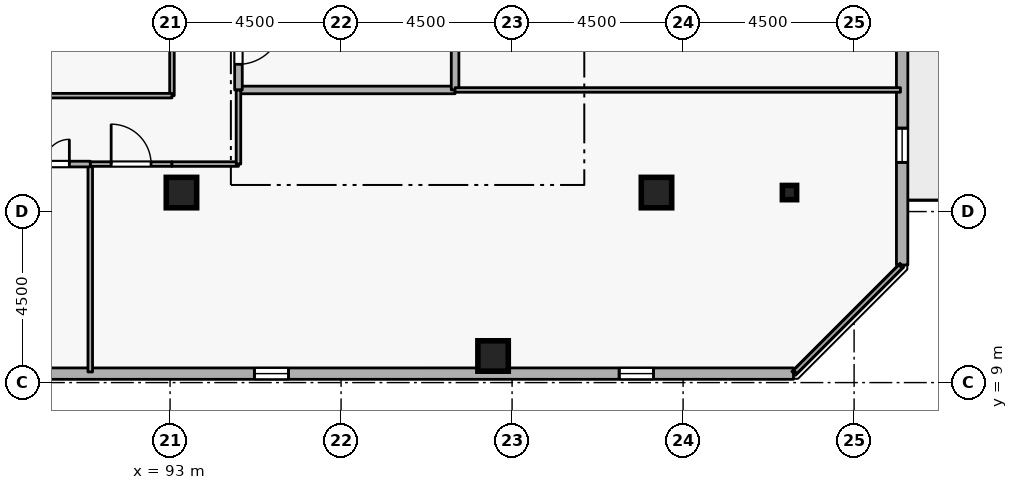
"""IFC4 building model, lengths in metres.
Left out: names, types, materials, properties, quantities, classifications, styles, units other than length and angle.
Written with IfcOpenShell. Run it as: python <this file> out.ifc"""

import sys

from ifc_helpers import new_model, si_unit, direction, frame, frame_2d, origin, origin_2d, place, context, subcontext, project, spatial, rectangle, i_section, extrude, element, fill, save


model = new_model("IFC4")
c1 = context("Model", 3, precision=1e-05, world=origin(), true_north=direction((0.0, 1.0)))
c2 = subcontext(c1, "Body", "Model", "MODEL_VIEW")
j1 = project(units=[si_unit("LENGTHUNIT", "METRE"), si_unit("PLANEANGLEUNIT", "RADIAN")], contexts=[c1])
p1 = place(None, origin())
s1 = spatial("IfcSite", under=j1, at=p1, CompositionType="ELEMENT")
p2 = place(p1, origin())
s2 = spatial("IfcBuilding", under=s1, at=p2, CompositionType="ELEMENT")
p3 = place(p2, frame((0.0, 0.0, 272.7)))
s3 = spatial("IfcBuildingStorey", under=s2, at=p3, CompositionType="ELEMENT", Elevation=272.7)
for number, where, z_axis, x_axis in (
    (1, (105.8, 14.0, 0.0), (0.0, 0.0, 1.0), (1.0, 0.0, 0.0)),
    (2, (101.5, 9.7, 0.0), (0.0, 0.0, 1.0), (1.0, 0.0, 0.0)),
    (3, (93.3, 14.0, 0.0), (0.0, 0.0, 1.0), (1.0, 0.0, 0.0)),
):
    element("IfcColumn", number, at=place(p3, frame(where, z_axis=z_axis, x_axis=x_axis)), inside=s3, PredefinedType="COLUMN", context=c2, shape_type="SweptSolid", body=[
        extrude(rectangle(XDim=0.8, YDim=0.8, at=origin_2d()), origin(), (0.0, 0.0, 1.0), 3.6),
    ])
p4 = place(p3, frame((109.3, 14.0, 0.0), z_axis=(0.0, 0.0, 1.0), x_axis=(1.0, 0.0, 0.0)))
e4 = element("IfcColumn", 4, at=p4, inside=s3, PredefinedType="COLUMN", context=c2, shape_type="SweptSolid", body=[
    extrude(i_section(OverallWidth=0.375, OverallDepth=0.375, WebThickness=0.017, FlangeThickness=0.027, FilletRadius=0.015, at=origin_2d()), origin(), (0.0, 0.0, 1.0), 3.6),
])
p5 = place(p3, frame((73.319, 9.235, 0.0), z_axis=(0.0, 0.0, 1.0), x_axis=(0.999999999634, 2.7061402e-05, 0.0)))
e5 = element("IfcWall", 5, at=p5, inside=s3, PredefinedType="STANDARD", context=c2, shape_type="SweptSolid", body=[
    extrude(rectangle(XDim=36.087, YDim=0.3, at=frame_2d((18.043, 0.0))), origin(), (0.0, 0.0, 1.0), 2.7),
])
p6 = place(p5, frame((7.5, 0.0, 0.72)))
e6 = element("IfcOpeningElement", 6, at=p6, cuts=e5, PredefinedType="OPENING", context=c2, shape_type="SweptSolid", body=[
    extrude(rectangle(XDim=0.9, YDim=1.75, at=frame_2d((0.45, 0.875))), frame((0.0, 0.16, 0.0), z_axis=(0.0, -1.0, 0.0), x_axis=(1.0, 0.0, 0.0)), (0.0, 0.0, 1.0), 0.32),
])
p7 = place(p5, frame((21.9, 0.0, 0.72)))
e7 = element("IfcOpeningElement", 7, at=p7, cuts=e5, PredefinedType="OPENING", context=c2, shape_type="SweptSolid", body=[
    extrude(rectangle(XDim=0.9, YDim=1.75, at=frame_2d((0.45, 0.875))), frame((0.0, 0.16, 0.0), z_axis=(0.0, -1.0, 0.0), x_axis=(1.0, 0.0, 0.0)), (0.0, 0.0, 1.0), 0.32),
])
p8 = place(p5, frame((31.5, 0.0, 0.72)))
e8 = element("IfcOpeningElement", 8, at=p8, cuts=e5, PredefinedType="OPENING", context=c2, shape_type="SweptSolid", body=[
    extrude(rectangle(XDim=0.9, YDim=1.75, at=frame_2d((0.45, 0.875))), frame((0.0, 0.16, 0.0), z_axis=(0.0, -1.0, 0.0), x_axis=(1.0, 0.0, 0.0)), (0.0, 0.0, 1.0), 0.32),
])
p9 = place(p3, frame((112.264, 12.094, 0.0), z_axis=(0.0, 0.0, 1.0), x_axis=(2.7061402e-05, 0.999999999634, 0.0)))
e9 = element("IfcWall", 9, at=p9, inside=s3, PredefinedType="STANDARD", context=c2, shape_type="SweptSolid", body=[
    extrude(rectangle(XDim=36.087, YDim=0.3, at=frame_2d((18.043, 0.0))), origin(), (0.0, 0.0, 1.0), 2.7),
])
p10 = place(p9, frame((22.993, 0.0, 0.0)))
e10 = element("IfcOpeningElement", 10, at=p10, cuts=e9, PredefinedType="OPENING", context=c2, shape_type="SweptSolid", body=[
    extrude(rectangle(XDim=1.0, YDim=2.08, at=frame_2d((0.5, 1.04))), frame((0.0, 0.16, 0.0), z_axis=(0.0, -1.0, 0.0), x_axis=(1.0, 0.0, 0.0)), (0.0, 0.0, 1.0), 0.32),
])
p11 = place(p9, frame((2.7, 0.0, 0.72)))
e11 = element("IfcOpeningElement", 11, at=p11, cuts=e9, PredefinedType="OPENING", context=c2, shape_type="SweptSolid", body=[
    extrude(rectangle(XDim=0.9, YDim=1.75, at=frame_2d((0.45, 0.875))), frame((0.0, 0.16, 0.0), z_axis=(0.0, -1.0, 0.0), x_axis=(1.0, 0.0, 0.0)), (0.0, 0.0, 1.0), 0.32),
])
p12 = place(p9, frame((7.5, 0.0, 0.72)))
e12 = element("IfcOpeningElement", 12, at=p12, cuts=e9, PredefinedType="OPENING", context=c2, shape_type="SweptSolid", body=[
    extrude(rectangle(XDim=0.9, YDim=1.75, at=frame_2d((0.45, 0.875))), frame((0.0, 0.16, 0.0), z_axis=(0.0, -1.0, 0.0), x_axis=(1.0, 0.0, 0.0)), (0.0, 0.0, 1.0), 0.32),
])
p13 = place(p9, frame((12.3, 0.0, 0.72)))
e13 = element("IfcOpeningElement", 13, at=p13, cuts=e9, PredefinedType="OPENING", context=c2, shape_type="SweptSolid", body=[
    extrude(rectangle(XDim=0.9, YDim=1.75, at=frame_2d((0.45, 0.875))), frame((0.0, 0.16, 0.0), z_axis=(0.0, -1.0, 0.0), x_axis=(1.0, 0.0, 0.0)), (0.0, 0.0, 1.0), 0.32),
])
p14 = place(p9, frame((17.1, 0.0, 0.72)))
e14 = element("IfcOpeningElement", 14, at=p14, cuts=e9, PredefinedType="OPENING", context=c2, shape_type="SweptSolid", body=[
    extrude(rectangle(XDim=0.9, YDim=1.75, at=frame_2d((0.45, 0.875))), frame((0.0, 0.16, 0.0), z_axis=(0.0, -1.0, 0.0), x_axis=(1.0, 0.0, 0.0)), (0.0, 0.0, 1.0), 0.32),
])
p15 = place(p9, frame((26.7, 0.0, 0.72)))
e15 = element("IfcOpeningElement", 15, at=p15, cuts=e9, PredefinedType="OPENING", context=c2, shape_type="SweptSolid", body=[
    extrude(rectangle(XDim=0.9, YDim=1.75, at=frame_2d((0.45, 0.875))), frame((0.0, 0.16, 0.0), z_axis=(0.0, -1.0, 0.0), x_axis=(1.0, 0.0, 0.0)), (0.0, 0.0, 1.0), 0.32),
])
p16 = place(p9, frame((31.5, 0.0, 0.72)))
e16 = element("IfcOpeningElement", 16, at=p16, cuts=e9, PredefinedType="OPENING", context=c2, shape_type="SweptSolid", body=[
    extrude(rectangle(XDim=0.9, YDim=1.75, at=frame_2d((0.45, 0.875))), frame((0.0, 0.16, 0.0), z_axis=(0.0, -1.0, 0.0), x_axis=(1.0, 0.0, 0.0)), (0.0, 0.0, 1.0), 0.32),
])
p17 = place(p3, frame((94.8, 16.7, 0.0), z_axis=(0.0, 0.0, 1.0), x_axis=(1.0, 0.0, 0.0)))
e17 = element("IfcWall", 17, at=p17, inside=s3, PredefinedType="STANDARD", context=c2, shape_type="SweptSolid", body=[
    extrude(rectangle(XDim=5.7, YDim=0.2, at=frame_2d((2.85, 0.0))), origin(), (0.0, 0.0, 1.0), 3.34),
])
p18 = place(p3, frame((100.5, 16.7, 0.0), z_axis=(0.0, 0.0, 1.0), x_axis=(0.0, 1.0, 0.0)))
e18 = element("IfcWall", 18, at=p18, inside=s3, PredefinedType="STANDARD", context=c2, shape_type="SweptSolid", body=[
    extrude(rectangle(XDim=2.5, YDim=0.2, at=frame_2d((1.25, 0.0))), origin(), (0.0, 0.0, 1.0), 3.34),
])
p19 = place(p3, frame((94.8, 19.2, 0.0), z_axis=(0.0, 0.0, 1.0), x_axis=(0.0, -1.0, 0.0)))
e19 = element("IfcWall", 19, at=p19, inside=s3, PredefinedType="STANDARD", context=c2, shape_type="SweptSolid", body=[
    extrude(rectangle(XDim=2.5, YDim=0.2, at=frame_2d((1.25, 0.0))), origin(), (0.0, 0.0, 1.0), 3.34),
])
p20 = place(p19, frame((0.675, 0.0, 0.0)))
e20 = element("IfcOpeningElement", 20, at=p20, cuts=e19, PredefinedType="OPENING", context=c2, shape_type="SweptSolid", body=[
    extrude(rectangle(XDim=1.15, YDim=2.1, at=frame_2d((0.575, 1.05))), frame((0.0, 0.11, 0.0), z_axis=(0.0, -1.0, 0.0), x_axis=(1.0, 0.0, 0.0)), (0.0, 0.0, 1.0), 0.22),
])
p21 = place(p3, frame((90.9, 9.28, 0.0), z_axis=(0.0, 0.0, 1.0), x_axis=(0.0, 1.0, 0.0)))
e21 = element("IfcWall", 21, at=p21, inside=s3, PredefinedType="PARTITIONING", context=c2, shape_type="SweptSolid", body=[
    extrude(rectangle(XDim=5.47, YDim=0.12, at=frame_2d((2.735, 0.0))), origin(), (0.0, 0.0, 1.0), 3.34),
])
p22 = place(p3, frame((90.9, 14.75, 0.0), z_axis=(0.0, 0.0, 1.0), x_axis=(1.0, 0.0, 0.0)))
e22 = element("IfcWall", 22, at=p22, inside=s3, PredefinedType="PARTITIONING", context=c2, shape_type="SweptSolid", body=[
    extrude(rectangle(XDim=2.15, YDim=0.12, at=frame_2d((1.075, 0.0))), origin(), (0.0, 0.0, 1.0), 3.34),
])
p23 = place(p22, frame((0.55, 0.0, 0.0)))
e23 = element("IfcOpeningElement", 23, at=p23, cuts=e22, PredefinedType="OPENING", context=c2, shape_type="SweptSolid", body=[
    extrude(rectangle(XDim=1.05, YDim=2.1, at=frame_2d((0.525, 1.05))), frame((0.0, 0.07, 0.0), z_axis=(0.0, -1.0, 0.0), x_axis=(1.0, 0.0, 0.0)), (0.0, 0.0, 1.0), 0.14),
])
p24 = place(p3, frame((93.05, 14.75, 0.0), z_axis=(0.0, 0.0, 1.0), x_axis=(1.0, 0.0, 0.0)))
e24 = element("IfcWall", 24, at=p24, inside=s3, PredefinedType="PARTITIONING", context=c2, shape_type="SweptSolid", body=[
    extrude(rectangle(XDim=1.75, YDim=0.12, at=frame_2d((0.875, 0.0))), origin(), (0.0, 0.0, 1.0), 3.34),
])
p25 = place(p3, frame((94.8, 14.75, 0.0), z_axis=(0.0, 0.0, 1.0), x_axis=(0.0, 1.0, 0.0)))
e25 = element("IfcWall", 25, at=p25, inside=s3, PredefinedType="PARTITIONING", context=c2, shape_type="SweptSolid", body=[
    extrude(rectangle(XDim=1.95, YDim=0.12, at=frame_2d((0.975, 0.0))), origin(), (0.0, 0.0, 1.0), 3.34),
])
p26 = place(p3, frame((100.5, 16.7, 0.0), z_axis=(0.0, 0.0, 1.0), x_axis=(1.0, 0.0, 0.0)))
e26 = element("IfcWall", 26, at=p26, inside=s3, PredefinedType="PARTITIONING", context=c2, shape_type="SweptSolid", body=[
    extrude(rectangle(XDim=11.72, YDim=0.12, at=frame_2d((5.86, 0.0))), origin(), (0.0, 0.0, 1.0), 3.34),
])
p27 = place(p3, frame((112.22, 12.052, 0.0), z_axis=(0.0, 0.0, 1.0), x_axis=(-0.707106781187, -0.707106781187, 0.0)))
e27 = element("IfcWall", 27, at=p27, inside=s3, PredefinedType="PARTITIONING", context=c2, shape_type="SweptSolid", body=[
    extrude(rectangle(XDim=3.919, YDim=0.12, at=frame_2d((1.96, 0.0))), origin(), (0.0, 0.0, 1.0), 3.34),
])
p28 = place(p3, frame((88.5, 14.75, 0.0), z_axis=(0.0, 0.0, 1.0), x_axis=(1.0, 0.0, 0.0)))
e28 = element("IfcWall", 28, at=p28, inside=s3, PredefinedType="PARTITIONING", context=c2, shape_type="SweptSolid", body=[
    extrude(rectangle(XDim=2.4, YDim=0.15, at=frame_2d((1.2, 0.0))), origin(), (0.0, 0.0, 1.0), 3.34),
])
p29 = place(p28, frame((0.55, 0.0, 0.0)))
e29 = element("IfcOpeningElement", 29, at=p29, cuts=e28, PredefinedType="OPENING", context=c2, shape_type="SweptSolid", body=[
    extrude(rectangle(XDim=1.3, YDim=2.12, at=frame_2d((0.65, 1.06))), frame((0.0, 0.085, 0.0), z_axis=(0.0, -1.0, 0.0), x_axis=(1.0, 0.0, 0.0)), (0.0, 0.0, 1.0), 0.17),
])
p30 = place(p3, frame((93.05, 22.4, 0.0), z_axis=(0.0, 0.0, 1.0), x_axis=(0.0, -1.0, 0.0)))
e30 = element("IfcWall", 30, at=p30, inside=s3, PredefinedType="PARTITIONING", context=c2, shape_type="SweptSolid", body=[
    extrude(rectangle(XDim=5.85, YDim=0.12, at=frame_2d((2.925, 0.0))), origin(), (0.0, 0.0, 1.0), 3.34),
])
p31 = place(p30, frame((2.45, 0.0, 0.0)))
e31 = element("IfcOpeningElement", 31, at=p31, cuts=e30, PredefinedType="OPENING", context=c2, shape_type="SweptSolid", body=[
    extrude(rectangle(XDim=0.95, YDim=2.1, at=frame_2d((0.475, 1.05))), frame((0.0, 0.07, 0.0), z_axis=(0.0, -1.0, 0.0), x_axis=(1.0, 0.0, 0.0)), (0.0, 0.0, 1.0), 0.14),
])
p32 = place(p3, frame((93.05, 16.55, 0.0), z_axis=(0.0, 0.0, 1.0), x_axis=(-1.0, 0.0, 0.0)))
e32 = element("IfcWall", 32, at=p32, inside=s3, PredefinedType="PARTITIONING", context=c2, shape_type="SweptSolid", body=[
    extrude(rectangle(XDim=3.75, YDim=0.12, at=frame_2d((1.875, 0.0))), origin(), (0.0, 0.0, 1.0), 3.34),
])
p33 = place(p7, origin())
e33 = element("IfcWindow", 33, at=p33, inside=s3, PartitioningType="SINGLE_PANEL", PredefinedType="WINDOW", context=c2, shape_type="SweptSolid", body=[
    extrude(rectangle(XDim=0.9, YDim=1.75, at=frame_2d((0.45, 0.875))), frame((0.0, 0.03, 0.0), z_axis=(0.0, -1.0, 0.0), x_axis=(1.0, 0.0, 0.0)), (0.0, 0.0, 1.0), 0.06),
])
fill(e7, e33)
p34 = place(p8, origin())
e34 = element("IfcWindow", 34, at=p34, inside=s3, PartitioningType="SINGLE_PANEL", PredefinedType="WINDOW", context=c2, shape_type="SweptSolid", body=[
    extrude(rectangle(XDim=0.9, YDim=1.75, at=frame_2d((0.45, 0.875))), frame((0.0, 0.03, 0.0), z_axis=(0.0, -1.0, 0.0), x_axis=(1.0, 0.0, 0.0)), (0.0, 0.0, 1.0), 0.06),
])
fill(e8, e34)
p35 = place(p11, origin())
e35 = element("IfcWindow", 35, at=p35, inside=s3, PartitioningType="SINGLE_PANEL", PredefinedType="WINDOW", context=c2, shape_type="SweptSolid", body=[
    extrude(rectangle(XDim=0.9, YDim=1.75, at=frame_2d((0.45, 0.875))), frame((0.0, 0.03, 0.0), z_axis=(0.0, -1.0, 0.0), x_axis=(1.0, 0.0, 0.0)), (0.0, 0.0, 1.0), 0.06),
])
fill(e11, e35)
p36 = place(p20, origin())
e36 = element("IfcDoor", 36, at=p36, inside=s3, OperationType="SINGLE_SWING_LEFT", PredefinedType="DOOR", context=c2, shape_type="SweptSolid", body=[
    extrude(rectangle(XDim=1.15, YDim=2.1, at=frame_2d((0.575, 1.05))), frame((0.0, 0.025, 0.0), z_axis=(0.0, -1.0, 0.0), x_axis=(1.0, 0.0, 0.0)), (0.0, 0.0, 1.0), 0.05),
])
fill(e20, e36)
p37 = place(p23, origin())
e37 = element("IfcDoor", 37, at=p37, inside=s3, OperationType="SINGLE_SWING_LEFT", PredefinedType="DOOR", context=c2, shape_type="SweptSolid", body=[
    extrude(rectangle(XDim=1.05, YDim=2.1, at=frame_2d((0.525, 1.05))), frame((0.0, 0.025, 0.0), z_axis=(0.0, -1.0, 0.0), x_axis=(1.0, 0.0, 0.0)), (0.0, 0.0, 1.0), 0.05),
])
fill(e23, e37)
p38 = place(p29, origin())
e38 = element("IfcDoor", 38, at=p38, inside=s3, OperationType="DOUBLE_DOOR_SINGLE_SWING", PredefinedType="DOOR", context=c2, shape_type="SweptSolid", body=[
    extrude(rectangle(XDim=1.3, YDim=2.12, at=frame_2d((0.65, 1.06))), frame((0.0, 0.025, 0.0), z_axis=(0.0, -1.0, 0.0), x_axis=(1.0, 0.0, 0.0)), (0.0, 0.0, 1.0), 0.05),
])
fill(e29, e38)
save(model, sys.argv[1])
